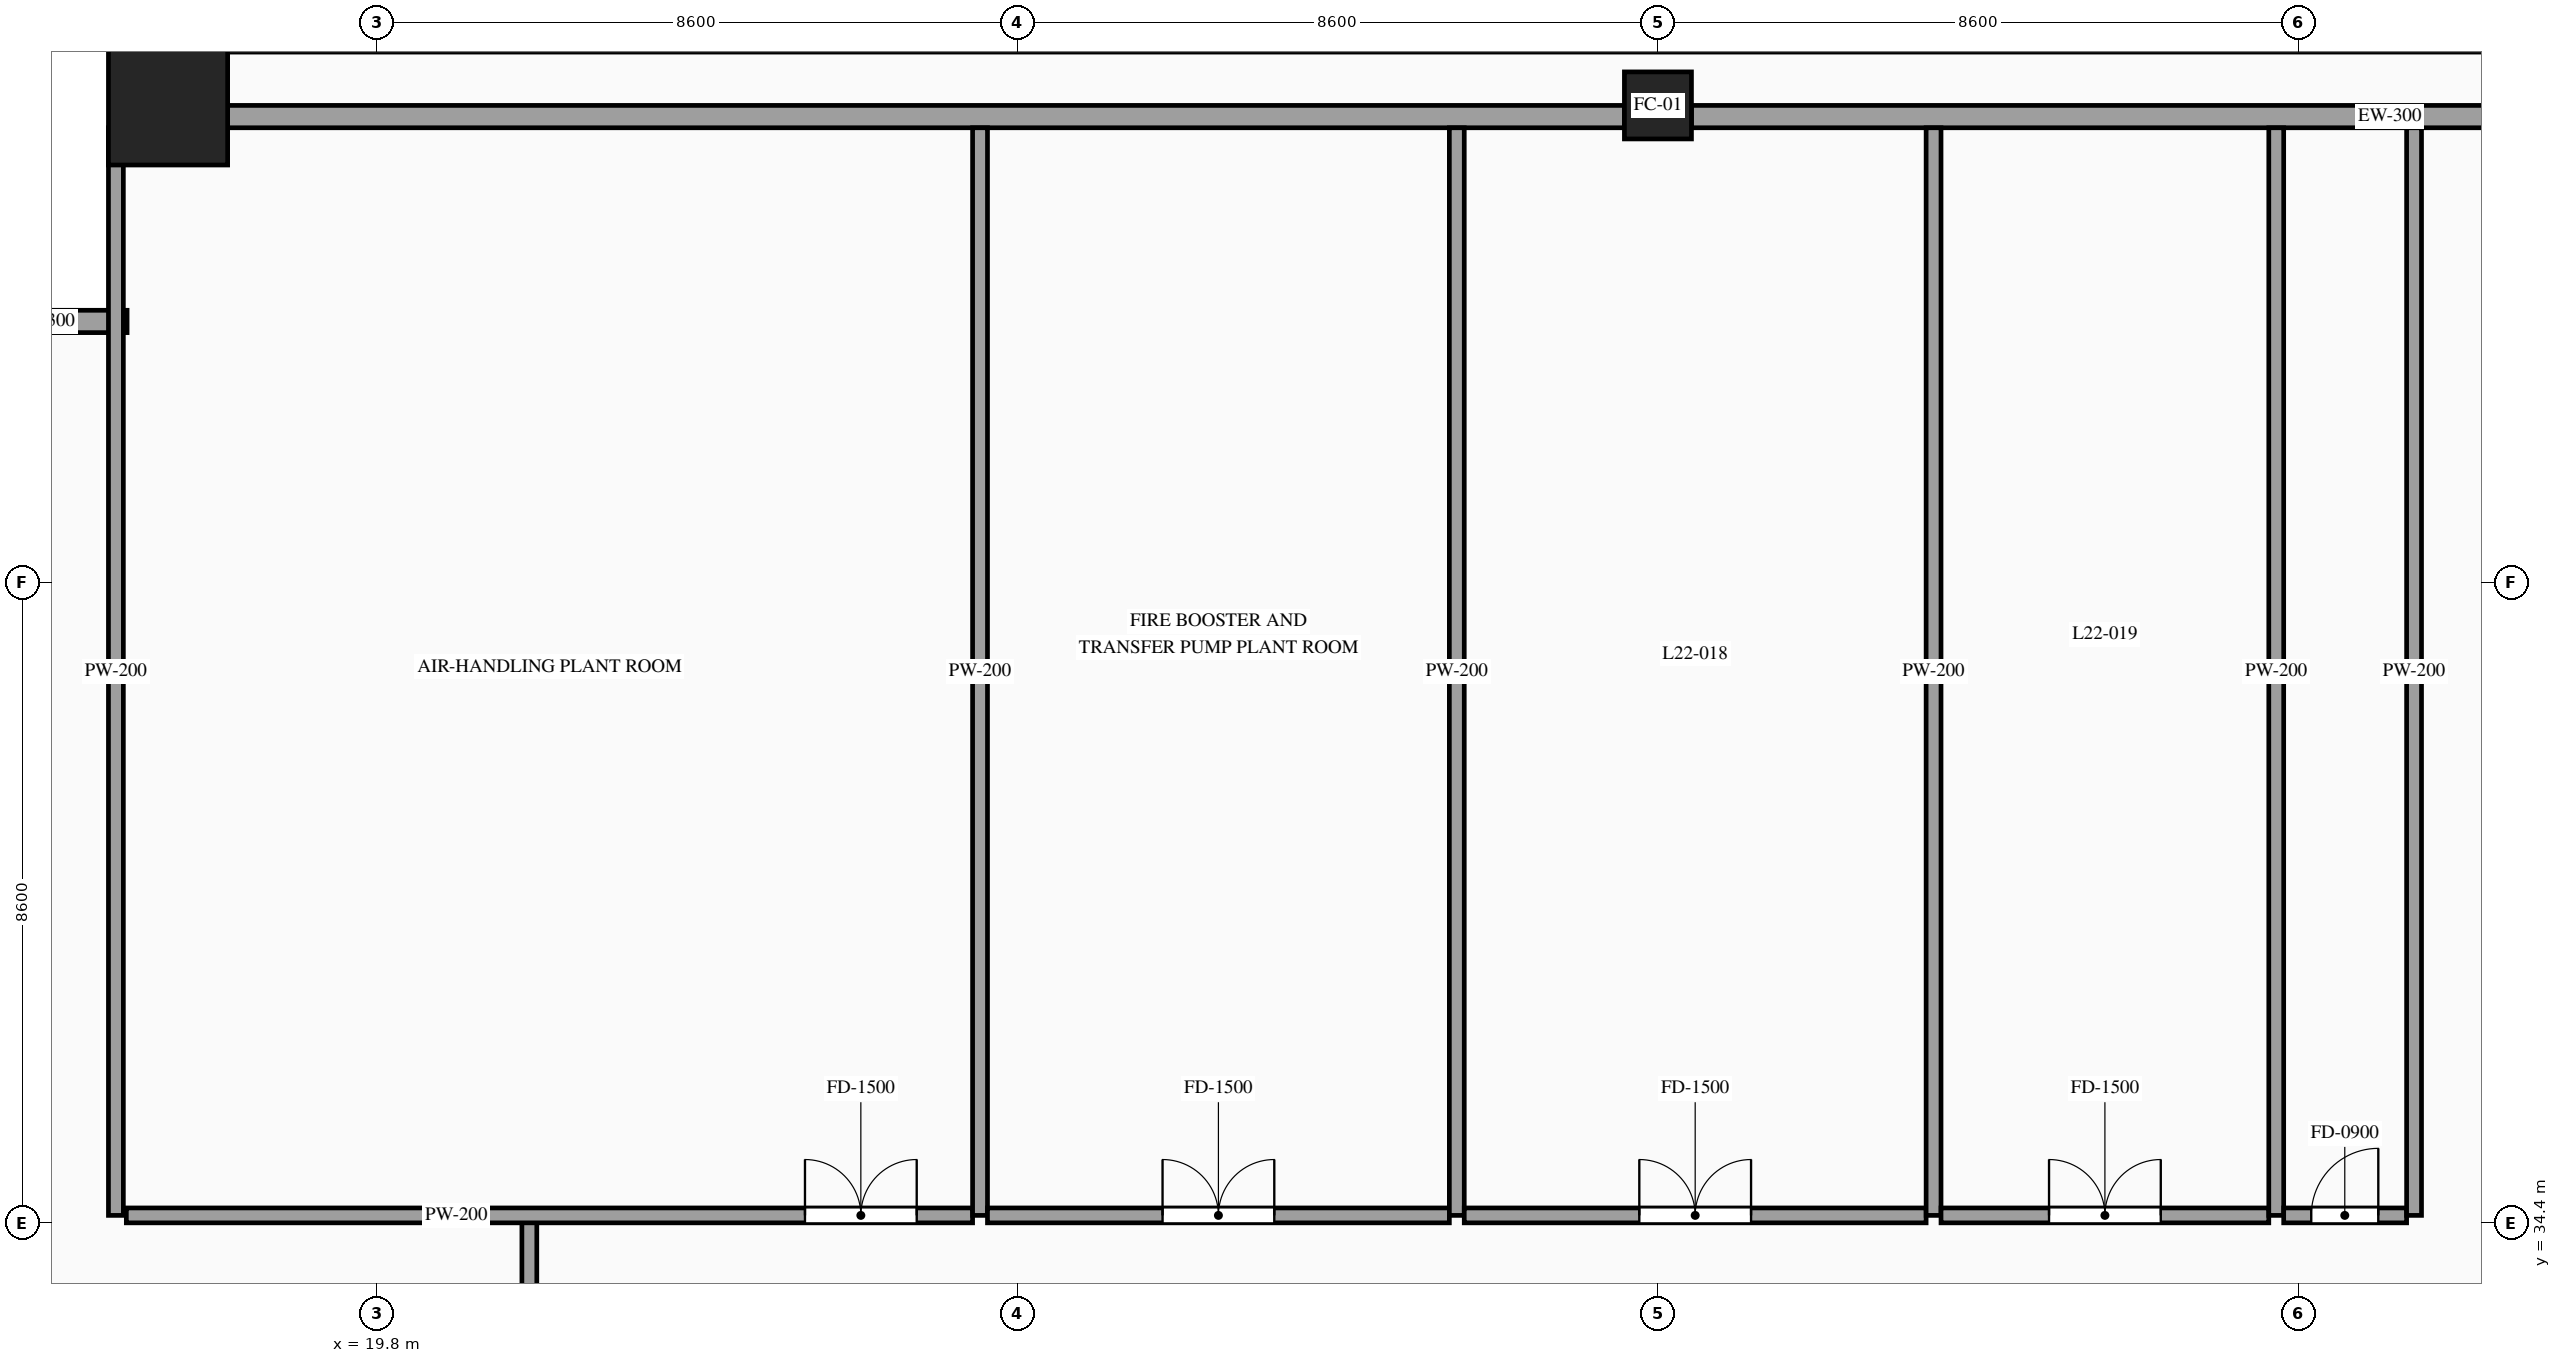
"""IFC4 building model, lengths in metres.
Left out: names, types, materials, properties, quantities, classifications, styles, units other than length and angle.
Written with IfcOpenShell. Run it as: python <this file> out.ifc"""

import sys

from ifc_helpers import new_model, si_unit, direction, frame, frame_2d, origin, origin_2d, place, context, subcontext, project, spatial, rectangle, hollow_rectangle, extrude, source, transform, mapped, element, fill, save


model = new_model("IFC4")
c1 = context("Model", 3, precision=1e-05, world=origin(), true_north=direction((0.0, 1.0)))
c2 = subcontext(c1, "Body", "Model", "MODEL_VIEW")
j1 = project(units=[si_unit("LENGTHUNIT", "METRE"), si_unit("PLANEANGLEUNIT", "RADIAN")], contexts=[c1])
p1 = place(None, origin())
s1 = spatial("IfcSite", under=j1, at=p1, CompositionType="ELEMENT")
p2 = place(p1, origin())
s2 = spatial("IfcBuilding", under=s1, at=p2, CompositionType="ELEMENT")
p3 = place(p2, frame((0.0, 0.0, 85.6)))
s3 = spatial("IfcBuildingStorey", under=s2, at=p3, CompositionType="ELEMENT", Elevation=85.6)
m1 = source(origin(), c2, "Body", "SweptSolid", [
    extrude(hollow_rectangle(XDim=1.6, YDim=1.6, WallThickness=0.07, at=origin_2d()), origin(), (0.0, 0.0, 1.0), 4.6),
])
p4 = place(p3, frame((17.0, 49.4, 0.0), z_axis=(0.0, 0.0, 1.0), x_axis=(1.0, 0.0, 0.0)))
e1 = element("IfcColumn", 1, at=p4, inside=s3, PredefinedType="COLUMN", context=c2, shape_type="MappedRepresentation", body=[
    mapped(m1, transform((0.0, 0.0, 0.0), scale=1.0)),
])
m2 = source(origin(), c2, "Body", "SweptSolid", [
    extrude(hollow_rectangle(XDim=0.9, YDim=0.9, WallThickness=0.042, at=origin_2d()), origin(), (0.0, 0.0, 1.0), 4.6),
])
p5 = place(p3, frame((37.0, 49.4, 0.0), z_axis=(0.0, 0.0, 1.0), x_axis=(1.0, 0.0, 0.0)))
e2 = element("IfcColumn", 2, at=p5, inside=s3, PredefinedType="COLUMN", context=c2, shape_type="MappedRepresentation", body=[
    mapped(m2, transform((0.0, 0.0, 0.0), scale=1.0)),
])
m3 = source(origin(), c2, "Body", "SweptSolid", [
    extrude(rectangle(XDim=2.25, YDim=0.3, at=frame_2d((1.125, 0.0))), origin(), (0.0, 0.0, 1.0), 4.38),
])
p6 = place(p3, frame((16.45, 46.5, 0.0), z_axis=(0.0, 0.0, 1.0), x_axis=(-1.0, 0.0, 0.0)))
e3 = element("IfcWall", 3, at=p6, inside=s3, PredefinedType="SOLIDWALL", context=c2, shape_type="MappedRepresentation", body=[
    mapped(m3, transform((0.0, 0.0, 0.0), scale=1.0)),
])
m4 = source(origin(), c2, "Body", "SweptSolid", [
    extrude(rectangle(XDim=18.75, YDim=0.3, at=frame_2d((9.375, 0.0))), origin(), (0.0, 0.0, 1.0), 3.775),
])
for number, where, z_axis, x_axis in (
    (4, (17.8, 49.25, 0.0), (0.0, 0.0, 1.0), (1.0, 0.0, 0.0)),
    (5, (37.45, 49.25, 0.0), (0.0, 0.0, 1.0), (1.0, 0.0, 0.0)),
):
    element("IfcWall", number, at=place(p3, frame(where, z_axis=z_axis, x_axis=x_axis)), inside=s3, PredefinedType="SOLIDWALL", context=c2, shape_type="MappedRepresentation", body=[
        mapped(m4, transform((0.0, 0.0, 0.0), scale=1.0)),
    ])
m5 = source(origin(), c2, "Body", "SweptSolid", [
    extrude(rectangle(XDim=14.6, YDim=0.2, at=frame_2d((7.3, 0.0))), origin(), (0.0, 0.0, 1.0), 4.38),
])
p7 = place(p3, frame((16.3, 34.5, 0.0), z_axis=(0.0, 0.0, 1.0), x_axis=(0.0, 1.0, 0.0)))
e6 = element("IfcWall", 6, at=p7, inside=s3, PredefinedType="PARTITIONING", context=c2, shape_type="MappedRepresentation", body=[
    mapped(m5, transform((0.0, 0.0, 0.0), scale=1.0)),
])
p8 = place(p3, frame((21.85, 28.1, 0.0), z_axis=(0.0, 0.0, 1.0), x_axis=(0.0, 1.0, 0.0)))
e7 = element("IfcWall", 7, at=p8, inside=s3, PredefinedType="PARTITIONING", context=c2, shape_type="SweptSolid", body=[
    extrude(rectangle(XDim=6.4, YDim=0.2, at=frame_2d((3.2, 0.0))), origin(), (0.0, 0.0, 1.0), 4.38),
])
p9 = place(p8, frame((0.7, 0.0, 0.0)))
e8 = element("IfcOpeningElement", 8, at=p9, cuts=e7, PredefinedType="OPENING", context=c2, shape_type="SweptSolid", body=[
    extrude(rectangle(XDim=1.0, YDim=2.2, at=frame_2d((0.5, 1.1))), frame((0.0, 0.115, 0.0), z_axis=(0.0, -1.0, 0.0), x_axis=(1.0, 0.0, 0.0)), (0.0, 0.0, 1.0), 0.23),
])
p10 = place(p3, frame((16.44, 34.5, 0.0), z_axis=(0.0, 0.0, 1.0), x_axis=(1.0, 0.0, 0.0)))
e9 = element("IfcWall", 9, at=p10, inside=s3, PredefinedType="PARTITIONING", context=c2, shape_type="SweptSolid", body=[
    extrude(rectangle(XDim=11.36, YDim=0.2, at=frame_2d((5.68, 0.0))), origin(), (0.0, 0.0, 1.0), 4.38),
])
p11 = place(p10, frame((9.11, 0.0, 0.0)))
e10 = element("IfcOpeningElement", 10, at=p11, cuts=e9, PredefinedType="OPENING", context=c2, shape_type="SweptSolid", body=[
    extrude(rectangle(XDim=1.5, YDim=2.3, at=frame_2d((0.75, 1.15))), frame((0.0, 0.115, 0.0), z_axis=(0.0, -1.0, 0.0), x_axis=(1.0, 0.0, 0.0)), (0.0, 0.0, 1.0), 0.23),
])
p12 = place(p3, frame((27.9, 34.5, 0.0), z_axis=(0.0, 0.0, 1.0), x_axis=(0.0, 1.0, 0.0)))
e11 = element("IfcWall", 11, at=p12, inside=s3, PredefinedType="PARTITIONING", context=c2, shape_type="MappedRepresentation", body=[
    mapped(m5, transform((0.0, 0.0, 0.0), scale=1.0)),
])
p13 = place(p3, frame((28.0, 34.5, 0.0), z_axis=(0.0, 0.0, 1.0), x_axis=(1.0, 0.0, 0.0)))
e12 = element("IfcWall", 12, at=p13, inside=s3, PredefinedType="PARTITIONING", context=c2, shape_type="SweptSolid", body=[
    extrude(rectangle(XDim=6.2, YDim=0.2, at=frame_2d((3.1, 0.0))), origin(), (0.0, 0.0, 1.0), 4.38),
])
p14 = place(p13, frame((2.35, 0.0, 0.0)))
e13 = element("IfcOpeningElement", 13, at=p14, cuts=e12, PredefinedType="OPENING", context=c2, shape_type="SweptSolid", body=[
    extrude(rectangle(XDim=1.5, YDim=2.3, at=frame_2d((0.75, 1.15))), frame((0.0, 0.115, 0.0), z_axis=(0.0, -1.0, 0.0), x_axis=(1.0, 0.0, 0.0)), (0.0, 0.0, 1.0), 0.23),
])
p15 = place(p3, frame((34.3, 34.5, 0.0), z_axis=(0.0, 0.0, 1.0), x_axis=(0.0, 1.0, 0.0)))
e14 = element("IfcWall", 14, at=p15, inside=s3, PredefinedType="PARTITIONING", context=c2, shape_type="MappedRepresentation", body=[
    mapped(m5, transform((0.0, 0.0, 0.0), scale=1.0)),
])
p16 = place(p3, frame((34.4, 34.5, 0.0), z_axis=(0.0, 0.0, 1.0), x_axis=(1.0, 0.0, 0.0)))
e15 = element("IfcWall", 15, at=p16, inside=s3, PredefinedType="PARTITIONING", context=c2, shape_type="SweptSolid", body=[
    extrude(rectangle(XDim=6.2, YDim=0.2, at=frame_2d((3.1, 0.0))), origin(), (0.0, 0.0, 1.0), 4.38),
])
p17 = place(p16, frame((2.35, 0.0, 0.0)))
e16 = element("IfcOpeningElement", 16, at=p17, cuts=e15, PredefinedType="OPENING", context=c2, shape_type="SweptSolid", body=[
    extrude(rectangle(XDim=1.5, YDim=2.3, at=frame_2d((0.75, 1.15))), frame((0.0, 0.115, 0.0), z_axis=(0.0, -1.0, 0.0), x_axis=(1.0, 0.0, 0.0)), (0.0, 0.0, 1.0), 0.23),
])
p18 = place(p3, frame((40.7, 34.5, 0.0), z_axis=(0.0, 0.0, 1.0), x_axis=(0.0, 1.0, 0.0)))
e17 = element("IfcWall", 17, at=p18, inside=s3, PredefinedType="PARTITIONING", context=c2, shape_type="MappedRepresentation", body=[
    mapped(m5, transform((0.0, 0.0, 0.0), scale=1.0)),
])
p19 = place(p3, frame((40.8, 34.5, 0.0), z_axis=(0.0, 0.0, 1.0), x_axis=(1.0, 0.0, 0.0)))
e18 = element("IfcWall", 18, at=p19, inside=s3, PredefinedType="PARTITIONING", context=c2, shape_type="SweptSolid", body=[
    extrude(rectangle(XDim=4.4, YDim=0.2, at=frame_2d((2.2, 0.0))), origin(), (0.0, 0.0, 1.0), 4.38),
])
p20 = place(p19, frame((1.45, 0.0, 0.0)))
e19 = element("IfcOpeningElement", 19, at=p20, cuts=e18, PredefinedType="OPENING", context=c2, shape_type="SweptSolid", body=[
    extrude(rectangle(XDim=1.5, YDim=2.3, at=frame_2d((0.75, 1.15))), frame((0.0, 0.115, 0.0), z_axis=(0.0, -1.0, 0.0), x_axis=(1.0, 0.0, 0.0)), (0.0, 0.0, 1.0), 0.23),
])
p21 = place(p3, frame((45.3, 34.5, 0.0), z_axis=(0.0, 0.0, 1.0), x_axis=(0.0, 1.0, 0.0)))
e20 = element("IfcWall", 20, at=p21, inside=s3, PredefinedType="PARTITIONING", context=c2, shape_type="MappedRepresentation", body=[
    mapped(m5, transform((0.0, 0.0, 0.0), scale=1.0)),
])
p22 = place(p3, frame((45.4, 34.5, 0.0), z_axis=(0.0, 0.0, 1.0), x_axis=(1.0, 0.0, 0.0)))
e21 = element("IfcWall", 21, at=p22, inside=s3, PredefinedType="PARTITIONING", context=c2, shape_type="SweptSolid", body=[
    extrude(rectangle(XDim=1.65, YDim=0.2, at=frame_2d((0.825, 0.0))), origin(), (0.0, 0.0, 1.0), 4.38),
])
p23 = place(p22, frame((0.37, 0.0, 0.0)))
e22 = element("IfcOpeningElement", 22, at=p23, cuts=e21, PredefinedType="OPENING", context=c2, shape_type="SweptSolid", body=[
    extrude(rectangle(XDim=0.9, YDim=2.15, at=frame_2d((0.45, 1.075))), frame((0.0, 0.115, 0.0), z_axis=(0.0, -1.0, 0.0), x_axis=(1.0, 0.0, 0.0)), (0.0, 0.0, 1.0), 0.23),
])
p24 = place(p3, frame((47.15, 34.5, 0.0), z_axis=(0.0, 0.0, 1.0), x_axis=(0.0, 1.0, 0.0)))
e23 = element("IfcWall", 23, at=p24, inside=s3, PredefinedType="PARTITIONING", context=c2, shape_type="MappedRepresentation", body=[
    mapped(m5, transform((0.0, 0.0, 0.0), scale=1.0)),
])
m6 = source(origin(), c2, "Body", "SweptSolid", [
    extrude(rectangle(XDim=1.5, YDim=2.3, at=frame_2d((0.75, 1.15))), frame((0.0, 0.025, 0.0), z_axis=(0.0, -1.0, 0.0), x_axis=(1.0, 0.0, 0.0)), (0.0, 0.0, 1.0), 0.05),
])
p25 = place(p11, origin())
e24 = element("IfcDoor", 24, at=p25, inside=s3, OperationType="DOUBLE_DOOR_SINGLE_SWING", PredefinedType="DOOR", context=c2, shape_type="MappedRepresentation", body=[
    mapped(m6, transform((0.0, 0.0, 0.0), scale=1.0)),
])
fill(e10, e24)
p26 = place(p14, origin())
e25 = element("IfcDoor", 25, at=p26, inside=s3, OperationType="DOUBLE_DOOR_SINGLE_SWING", PredefinedType="DOOR", context=c2, shape_type="MappedRepresentation", body=[
    mapped(m6, transform((0.0, 0.0, 0.0), scale=1.0)),
])
fill(e13, e25)
p27 = place(p17, origin())
e26 = element("IfcDoor", 26, at=p27, inside=s3, OperationType="DOUBLE_DOOR_SINGLE_SWING", PredefinedType="DOOR", context=c2, shape_type="MappedRepresentation", body=[
    mapped(m6, transform((0.0, 0.0, 0.0), scale=1.0)),
])
fill(e16, e26)
p28 = place(p20, origin())
e27 = element("IfcDoor", 27, at=p28, inside=s3, OperationType="DOUBLE_DOOR_SINGLE_SWING", PredefinedType="DOOR", context=c2, shape_type="MappedRepresentation", body=[
    mapped(m6, transform((0.0, 0.0, 0.0), scale=1.0)),
])
fill(e19, e27)
m7 = source(origin(), c2, "Body", "SweptSolid", [
    extrude(rectangle(XDim=0.9, YDim=2.15, at=frame_2d((0.45, 1.075))), frame((0.0, 0.025, 0.0), z_axis=(0.0, -1.0, 0.0), x_axis=(1.0, 0.0, 0.0)), (0.0, 0.0, 1.0), 0.05),
])
p29 = place(p23, origin())
e28 = element("IfcDoor", 28, at=p29, inside=s3, OperationType="SINGLE_SWING_RIGHT", PredefinedType="DOOR", context=c2, shape_type="MappedRepresentation", body=[
    mapped(m7, transform((0.0, 0.0, 0.0), scale=1.0)),
])
fill(e22, e28)
save(model, sys.argv[1])
